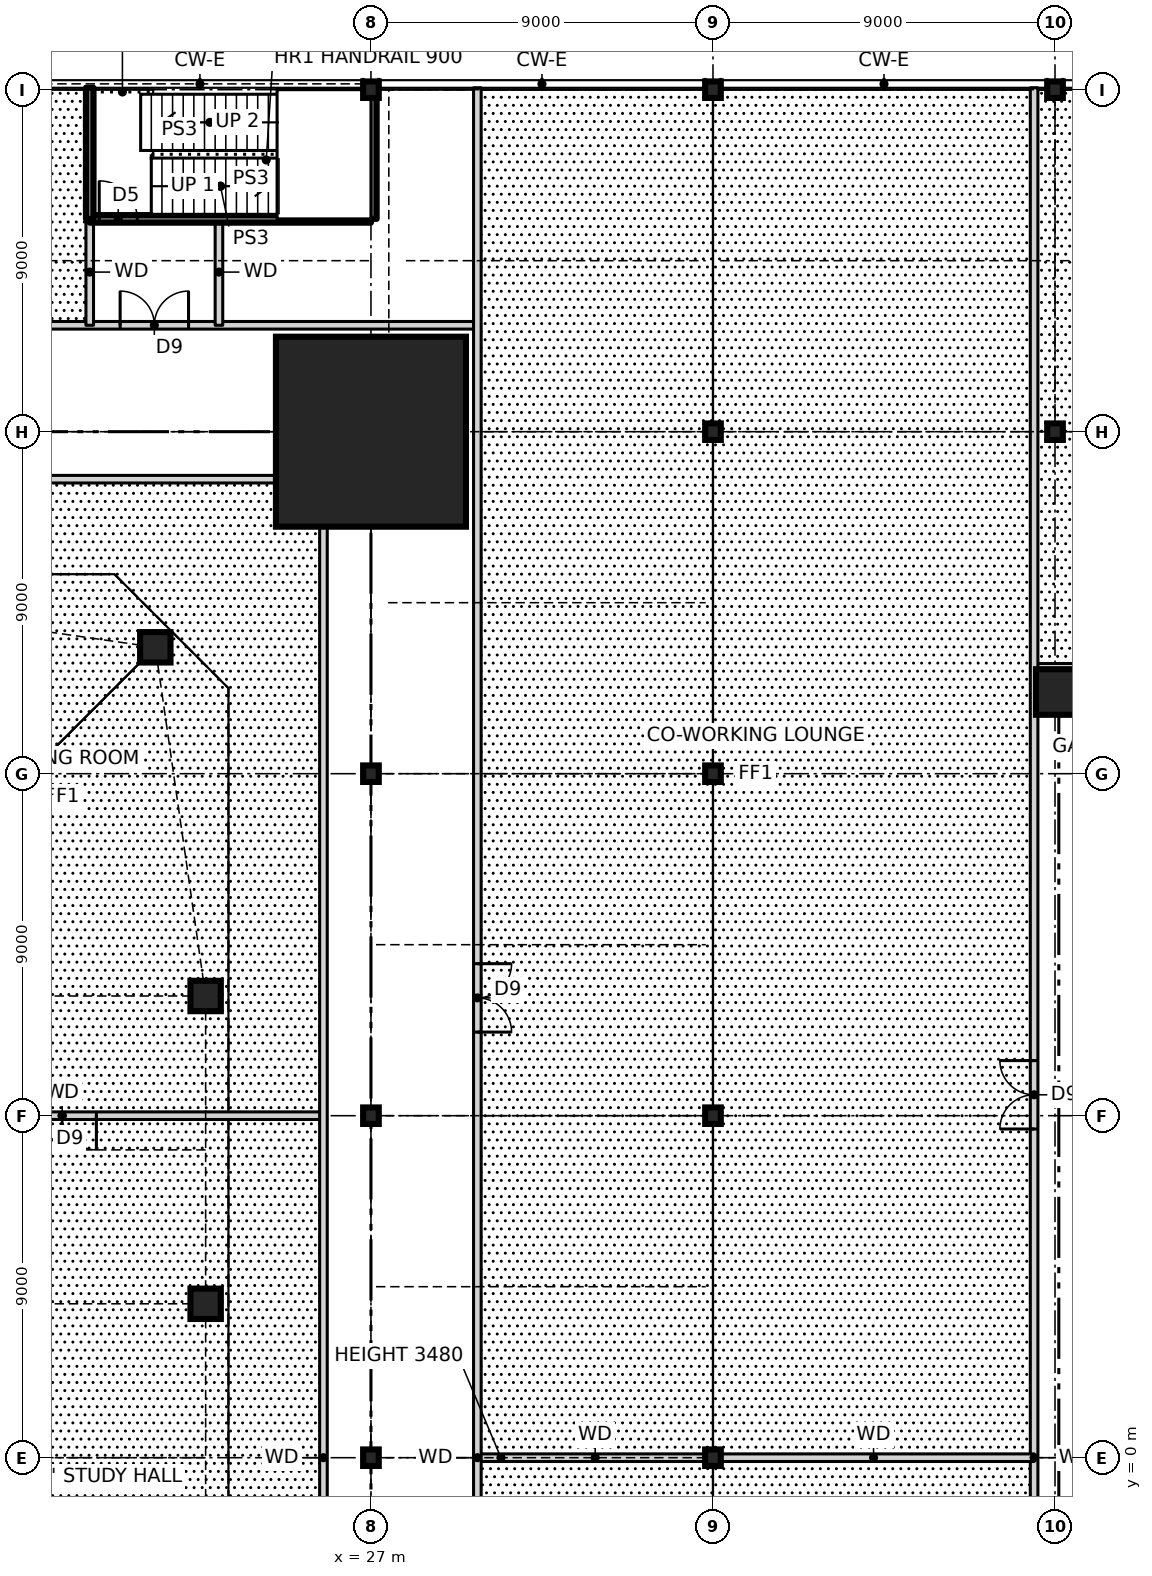
"""IFC4 building model, lengths in metres.
Left out: names, types, materials, properties, quantities, classifications, styles, units other than length and angle.
Written with IfcOpenShell. Run it as: python <this file> out.ifc"""

import sys

from ifc_helpers import new_model, si_unit, direction, frame, frame_2d, origin, origin_2d, place, context, subcontext, project, spatial, rectangle, hollow_rectangle, i_section, extrude, element, fill, save


model = new_model("IFC4")
c1 = context("Model", 3, precision=1e-05, world=origin(), true_north=direction((0.0, 1.0)))
c2 = subcontext(c1, "Body", "Model", "MODEL_VIEW")
j1 = project(units=[si_unit("LENGTHUNIT", "METRE"), si_unit("PLANEANGLEUNIT", "RADIAN")], contexts=[c1])
p1 = place(None, origin())
s1 = spatial("IfcSite", under=j1, at=p1, CompositionType="ELEMENT")
p2 = place(p1, origin())
s2 = spatial("IfcBuilding", under=s1, at=p2, CompositionType="ELEMENT")
p3 = place(p2, frame((0.0, 0.0, 6.0)))
s3 = spatial("IfcBuildingStorey", under=s2, at=p3, CompositionType="ELEMENT", Elevation=6.0)
for number, where, z_axis, x_axis in (
    (1, (22.65, 4.05, 0.0), (0.0, 0.0, 1.0), (1.0, 0.0, 0.0)),
    (2, (22.65, 12.15, 0.0), (0.0, 0.0, 1.0), (1.0, 0.0, 0.0)),
    (3, (21.326, 21.326, 0.0), (0.0, 0.0, 1.0), (1.0, 0.0, 0.0)),
):
    element("IfcColumn", number, at=place(p3, frame(where, z_axis=z_axis, x_axis=x_axis)), inside=s3, PredefinedType="COLUMN", context=c2, shape_type="SweptSolid", body=[
        extrude(hollow_rectangle(XDim=0.8, YDim=0.8, WallThickness=0.09, at=origin_2d()), origin(), (0.0, 0.0, 1.0), 4.5),
    ])
p4 = place(p3, frame((27.0, 27.0, 0.0), z_axis=(0.0, 0.0, 1.0), x_axis=(1.0, 0.0, 0.0)))
e4 = element("IfcColumn", 4, at=p4, inside=s3, PredefinedType="COLUMN", context=c2, shape_type="SweptSolid", body=[
    extrude(rectangle(XDim=5.0, YDim=5.0, at=origin_2d()), origin(), (0.0, 0.0, 1.0), 4.5),
    extrude(i_section(OverallWidth=0.478, OverallDepth=0.599, WebThickness=0.1, FlangeThickness=0.14, at=origin_2d()), origin(), (0.0, 0.0, 1.0), 4.5),
])
p5 = place(p3, frame((45.1, 20.15, 0.0), z_axis=(0.0, 0.0, 1.0), x_axis=(1.0, 0.0, 0.0)))
e5 = element("IfcColumn", 5, at=p5, inside=s3, PredefinedType="COLUMN", context=c2, shape_type="SweptSolid", body=[
    extrude(hollow_rectangle(XDim=1.2, YDim=1.2, WallThickness=0.07, at=origin_2d()), origin(), (0.0, 0.0, 1.0), 4.5),
])
for number, where, z_axis, x_axis in (
    (6, (27.0, 0.0, 0.0), (0.0, 0.0, 1.0), (1.0, 0.0, 0.0)),
    (7, (27.0, 9.0, 0.0), (0.0, 0.0, 1.0), (1.0, 0.0, 0.0)),
    (8, (27.0, 18.0, 0.0), (0.0, 0.0, 1.0), (1.0, 0.0, 0.0)),
    (9, (27.0, 36.0, 0.0), (0.0, 0.0, 1.0), (1.0, 0.0, 0.0)),
    (10, (36.0, 0.0, 0.0), (0.0, 0.0, 1.0), (1.0, 0.0, 0.0)),
    (11, (36.0, 9.0, 0.0), (0.0, 0.0, 1.0), (1.0, 0.0, 0.0)),
    (12, (36.0, 18.0, 0.0), (0.0, 0.0, 1.0), (1.0, 0.0, 0.0)),
    (13, (36.0, 27.0, 0.0), (0.0, 0.0, 1.0), (1.0, 0.0, 0.0)),
    (14, (36.0, 36.0, 0.0), (0.0, 0.0, 1.0), (1.0, 0.0, 0.0)),
    (15, (45.0, 27.0, 0.0), (0.0, 0.0, 1.0), (1.0, 0.0, 0.0)),
    (16, (45.0, 36.0, 0.0), (0.0, 0.0, 1.0), (1.0, 0.0, 0.0)),
):
    element("IfcColumn", number, at=place(p3, frame(where, z_axis=z_axis, x_axis=x_axis)), inside=s3, PredefinedType="COLUMN", context=c2, shape_type="SweptSolid", body=[
        extrude(i_section(OverallWidth=0.411, OverallDepth=0.434, WebThickness=0.036, FlangeThickness=0.057, at=origin_2d()), origin(), (0.0, 0.0, 1.0), 4.5),
    ])
p6 = place(p2, origin())
s4 = spatial("IfcBuildingStorey", under=s2, at=p6, CompositionType="ELEMENT", Elevation=0.0)
for number, where, z_axis, x_axis in (
    (17, (27.506, 36.25, -0.15), (0.0, 0.0, 1.0), (0.0, 1.0, 0.0)),
    (18, (44.494, 36.25, -0.15), (0.0, 0.0, 1.0), (0.0, 1.0, 0.0)),
):
    element("IfcWall", number, at=place(p6, frame(where, z_axis=z_axis, x_axis=x_axis)), inside=s4, PredefinedType="SOLIDWALL", context=c2, shape_type="SweptSolid", body=[
        extrude(rectangle(XDim=3.05, YDim=0.6, at=frame_2d((1.525, 0.0))), origin(), (0.0, 0.0, 1.0), 9.15),
    ])
p7 = place(p3, frame((29.8, 0.0, 0.0), z_axis=(0.0, 0.0, 1.0), x_axis=(1.0, 0.0, 0.0)))
e19 = element("IfcWall", 19, at=p7, inside=s3, PredefinedType="SOLIDWALL", context=c2, shape_type="SweptSolid", body=[
    extrude(rectangle(XDim=6.2, YDim=0.2, at=frame_2d((3.1, 0.0))), origin(), (0.0, 0.0, 1.0), 3.48),
])
p8 = place(p3, frame((12.0, 9.0, 0.0), z_axis=(0.0, 0.0, 1.0), x_axis=(1.0, 0.0, 0.0)))
e20 = element("IfcWall", 20, at=p8, inside=s3, PredefinedType="SOLIDWALL", context=c2, shape_type="SweptSolid", body=[
    extrude(rectangle(XDim=13.75, YDim=0.2, at=frame_2d((6.875, 0.0))), origin(), (0.0, 0.0, 1.0), 4.25),
])
p9 = place(p8, frame((5.975, 0.0, 0.0)))
e21 = element("IfcOpeningElement", 21, at=p9, cuts=e20, PredefinedType="OPENING", context=c2, shape_type="SweptSolid", body=[
    extrude(rectangle(XDim=1.8, YDim=2.1, at=frame_2d((0.9, 1.05))), frame((0.0, 0.11, 0.0), z_axis=(0.0, -1.0, 0.0), x_axis=(1.0, 0.0, 0.0)), (0.0, 0.0, 1.0), 0.22),
])
p10 = place(p3, frame((44.45, 20.8, 0.0), z_axis=(0.0, 0.0, 1.0), x_axis=(1.0, 0.0, 0.0)))
e22 = element("IfcWall", 22, at=p10, inside=s3, PredefinedType="SOLIDWALL", context=c2, shape_type="SweptSolid", body=[
    extrude(rectangle(XDim=37.1, YDim=0.2, at=frame_2d((18.55, 0.0))), origin(), (0.0, 0.0, 1.0), 4.25),
])
p11 = place(p10, frame((9.325, 0.0, 0.0)))
e23 = element("IfcOpeningElement", 23, at=p11, cuts=e22, PredefinedType="OPENING", context=c2, shape_type="SweptSolid", body=[
    extrude(rectangle(XDim=1.8, YDim=2.1, at=frame_2d((0.9, 1.05))), frame((0.0, 0.11, 0.0), z_axis=(0.0, -1.0, 0.0), x_axis=(1.0, 0.0, 0.0)), (0.0, 0.0, 1.0), 0.22),
])
p12 = place(p10, frame((31.125, 0.0, 0.0)))
e24 = element("IfcOpeningElement", 24, at=p12, cuts=e22, PredefinedType="OPENING", context=c2, shape_type="SweptSolid", body=[
    extrude(rectangle(XDim=1.8, YDim=2.1, at=frame_2d((0.9, 1.05))), frame((0.0, 0.11, 0.0), z_axis=(0.0, -1.0, 0.0), x_axis=(1.0, 0.0, 0.0)), (0.0, 0.0, 1.0), 0.22),
])
p13 = place(p10, frame((19.35, 0.0, 0.0)))
e25 = element("IfcOpeningElement", 25, at=p13, cuts=e22, PredefinedType="OPENING", context=c2, shape_type="SweptSolid", body=[
    extrude(rectangle(XDim=1.8, YDim=2.1, at=frame_2d((0.9, 1.05))), frame((0.0, 0.11, 0.0), z_axis=(0.0, -1.0, 0.0), x_axis=(1.0, 0.0, 0.0)), (0.0, 0.0, 1.0), 0.22),
])
p14 = place(p3, frame((-25.75, 25.75, 0.0), z_axis=(0.0, 0.0, 1.0), x_axis=(1.0, 0.0, 0.0)))
e26 = element("IfcWall", 26, at=p14, inside=s3, PredefinedType="SOLIDWALL", context=c2, shape_type="SweptSolid", body=[
    extrude(rectangle(XDim=51.5, YDim=0.2, at=frame_2d((25.75, 0.0))), origin(), (0.0, 0.0, 1.0), 4.25),
])
p15 = place(p3, frame((-29.8, 29.8, 0.0), z_axis=(0.0, 0.0, 1.0), x_axis=(1.0, 0.0, 0.0)))
e27 = element("IfcWall", 27, at=p15, inside=s3, PredefinedType="SOLIDWALL", context=c2, shape_type="SweptSolid", body=[
    extrude(rectangle(XDim=59.6, YDim=0.2, at=frame_2d((29.8, 0.0))), origin(), (0.0, 0.0, 1.0), 4.25),
])
p16 = place(p15, frame((8.1, 0.0, 0.0)))
e28 = element("IfcOpeningElement", 28, at=p16, cuts=e27, PredefinedType="OPENING", context=c2, shape_type="SweptSolid", body=[
    extrude(rectangle(XDim=1.8, YDim=2.1, at=frame_2d((0.9, 1.05))), frame((0.0, 0.11, 0.0), z_axis=(0.0, -1.0, 0.0), x_axis=(1.0, 0.0, 0.0)), (0.0, 0.0, 1.0), 0.22),
])
p17 = place(p15, frame((22.9, 0.0, 0.0)))
e29 = element("IfcOpeningElement", 29, at=p17, cuts=e27, PredefinedType="OPENING", context=c2, shape_type="SweptSolid", body=[
    extrude(rectangle(XDim=1.8, YDim=2.1, at=frame_2d((0.9, 1.05))), frame((0.0, 0.11, 0.0), z_axis=(0.0, -1.0, 0.0), x_axis=(1.0, 0.0, 0.0)), (0.0, 0.0, 1.0), 0.22),
])
p18 = place(p15, frame((28.9, 0.0, 0.0)))
e30 = element("IfcOpeningElement", 30, at=p18, cuts=e27, PredefinedType="OPENING", context=c2, shape_type="SweptSolid", body=[
    extrude(rectangle(XDim=1.8, YDim=2.1, at=frame_2d((0.9, 1.05))), frame((0.0, 0.11, 0.0), z_axis=(0.0, -1.0, 0.0), x_axis=(1.0, 0.0, 0.0)), (0.0, 0.0, 1.0), 0.22),
])
p19 = place(p15, frame((33.2, 0.0, 0.0)))
e31 = element("IfcOpeningElement", 31, at=p19, cuts=e27, PredefinedType="OPENING", context=c2, shape_type="SweptSolid", body=[
    extrude(rectangle(XDim=1.8, YDim=2.1, at=frame_2d((0.9, 1.05))), frame((0.0, 0.11, 0.0), z_axis=(0.0, -1.0, 0.0), x_axis=(1.0, 0.0, 0.0)), (0.0, 0.0, 1.0), 0.22),
])
p20 = place(p15, frame((41.0, 0.0, 0.0)))
e32 = element("IfcOpeningElement", 32, at=p20, cuts=e27, PredefinedType="OPENING", context=c2, shape_type="SweptSolid", body=[
    extrude(rectangle(XDim=1.8, YDim=2.1, at=frame_2d((0.9, 1.05))), frame((0.0, 0.11, 0.0), z_axis=(0.0, -1.0, 0.0), x_axis=(1.0, 0.0, 0.0)), (0.0, 0.0, 1.0), 0.22),
])
p21 = place(p15, frame((50.2, 0.0, 0.0)))
e33 = element("IfcOpeningElement", 33, at=p21, cuts=e27, PredefinedType="OPENING", context=c2, shape_type="SweptSolid", body=[
    extrude(rectangle(XDim=1.8, YDim=2.1, at=frame_2d((0.9, 1.05))), frame((0.0, 0.11, 0.0), z_axis=(0.0, -1.0, 0.0), x_axis=(1.0, 0.0, 0.0)), (0.0, 0.0, 1.0), 0.22),
])
p22 = place(p3, frame((19.6, 32.6, 0.0), z_axis=(0.0, 0.0, 1.0), x_axis=(1.0, 0.0, 0.0)))
e34 = element("IfcWall", 34, at=p22, inside=s3, PredefinedType="SOLIDWALL", context=c2, shape_type="SweptSolid", body=[
    extrude(rectangle(XDim=7.4, YDim=0.2, at=frame_2d((3.7, 0.0))), origin(), (0.0, 0.0, 1.0), 4.5),
])
p23 = place(p22, frame((0.25, 0.0, 0.0)))
e35 = element("IfcOpeningElement", 35, at=p23, cuts=e34, PredefinedType="OPENING", context=c2, shape_type="SweptSolid", body=[
    extrude(rectangle(XDim=1.0, YDim=2.1, at=frame_2d((0.5, 1.05))), frame((0.0, 0.11, 0.0), z_axis=(0.0, -1.0, 0.0), x_axis=(1.0, 0.0, 0.0)), (0.0, 0.0, 1.0), 0.22),
])
p24 = place(p3, frame((44.45, -36.05, 0.0), z_axis=(0.0, 0.0, 1.0), x_axis=(0.0, 1.0, 0.0)))
e36 = element("IfcWall", 36, at=p24, inside=s3, PredefinedType="SOLIDWALL", context=c2, shape_type="SweptSolid", body=[
    extrude(rectangle(XDim=72.1, YDim=0.2, at=frame_2d((36.05, 0.0))), origin(), (0.0, 0.0, 1.0), 4.25),
])
p25 = place(p24, frame((25.6, 0.0, 0.0)))
e37 = element("IfcOpeningElement", 37, at=p25, cuts=e36, PredefinedType="OPENING", context=c2, shape_type="SweptSolid", body=[
    extrude(rectangle(XDim=1.8, YDim=2.1, at=frame_2d((0.9, 1.05))), frame((0.0, 0.11, 0.0), z_axis=(0.0, -1.0, 0.0), x_axis=(1.0, 0.0, 0.0)), (0.0, 0.0, 1.0), 0.22),
])
p26 = place(p24, frame((44.7, 0.0, 0.0)))
e38 = element("IfcOpeningElement", 38, at=p26, cuts=e36, PredefinedType="OPENING", context=c2, shape_type="SweptSolid", body=[
    extrude(rectangle(XDim=1.8, YDim=2.1, at=frame_2d((0.9, 1.05))), frame((0.0, 0.11, 0.0), z_axis=(0.0, -1.0, 0.0), x_axis=(1.0, 0.0, 0.0)), (0.0, 0.0, 1.0), 0.22),
])
p27 = place(p3, frame((29.8, -36.05, 0.0), z_axis=(0.0, 0.0, 1.0), x_axis=(0.0, 1.0, 0.0)))
e39 = element("IfcWall", 39, at=p27, inside=s3, PredefinedType="SOLIDWALL", context=c2, shape_type="SweptSolid", body=[
    extrude(rectangle(XDim=72.1, YDim=0.2, at=frame_2d((36.05, 0.0))), origin(), (0.0, 0.0, 1.0), 4.25),
])
p28 = place(p27, frame((23.05, 0.0, 0.0)))
e40 = element("IfcOpeningElement", 40, at=p28, cuts=e39, PredefinedType="OPENING", context=c2, shape_type="SweptSolid", body=[
    extrude(rectangle(XDim=1.8, YDim=2.1, at=frame_2d((0.9, 1.05))), frame((0.0, 0.11, 0.0), z_axis=(0.0, -1.0, 0.0), x_axis=(1.0, 0.0, 0.0)), (0.0, 0.0, 1.0), 0.22),
])
p29 = place(p27, frame((47.25, 0.0, 0.0)))
e41 = element("IfcOpeningElement", 41, at=p29, cuts=e39, PredefinedType="OPENING", context=c2, shape_type="SweptSolid", body=[
    extrude(rectangle(XDim=1.8, YDim=2.1, at=frame_2d((0.9, 1.05))), frame((0.0, 0.11, 0.0), z_axis=(0.0, -1.0, 0.0), x_axis=(1.0, 0.0, 0.0)), (0.0, 0.0, 1.0), 0.22),
])
p30 = place(p3, frame((27.0, 32.6, 0.0), z_axis=(0.0, 0.0, 1.0), x_axis=(0.0, 1.0, 0.0)))
e42 = element("IfcWall", 42, at=p30, inside=s3, PredefinedType="SOLIDWALL", context=c2, shape_type="SweptSolid", body=[
    extrude(rectangle(XDim=3.183, YDim=0.3, at=frame_2d((1.591, 0.0))), origin(), (0.0, 0.0, 1.0), 4.5),
])
p31 = place(p3, frame((25.75, -25.75, 0.0), z_axis=(0.0, 0.0, 1.0), x_axis=(0.0, 1.0, 0.0)))
e43 = element("IfcWall", 43, at=p31, inside=s3, PredefinedType="SOLIDWALL", context=c2, shape_type="SweptSolid", body=[
    extrude(rectangle(XDim=51.5, YDim=0.2, at=frame_2d((25.75, 0.0))), origin(), (0.0, 0.0, 1.0), 4.25),
])
for number, where, z_axis, x_axis in (
    (44, (23.0, 29.8, 0.0), (0.0, 0.0, 1.0), (0.0, 1.0, 0.0)),
    (45, (19.6, 29.8, 0.0), (0.0, 0.0, 1.0), (0.0, 1.0, 0.0)),
):
    element("IfcWall", number, at=place(p3, frame(where, z_axis=z_axis, x_axis=x_axis)), inside=s3, PredefinedType="SOLIDWALL", context=c2, shape_type="SweptSolid", body=[
        extrude(rectangle(XDim=2.8, YDim=0.2, at=frame_2d((1.4, 0.0))), origin(), (0.0, 0.0, 1.0), 4.25),
    ])
p32 = place(p3, frame((19.6, 32.6, 0.0), z_axis=(0.0, 0.0, 1.0), x_axis=(0.0, 1.0, 0.0)))
e46 = element("IfcWall", 46, at=p32, inside=s3, PredefinedType="SOLIDWALL", context=c2, shape_type="SweptSolid", body=[
    extrude(rectangle(XDim=3.45, YDim=0.2, at=frame_2d((1.725, 0.0))), origin(), (0.0, 0.0, 1.0), 4.5),
])
p33 = place(p3, frame((36.0, 0.0, 0.0), z_axis=(0.0, 0.0, 1.0), x_axis=(1.0, 0.0, 0.0)))
e47 = element("IfcWall", 47, at=p33, inside=s3, PredefinedType="SOLIDWALL", context=c2, shape_type="SweptSolid", body=[
    extrude(rectangle(XDim=8.45, YDim=0.2, at=frame_2d((4.225, 0.0))), origin(), (0.0, 0.0, 1.0), 4.25),
])
p34 = place(p9, frame((1.8, 0.0, 0.0), z_axis=(0.0, 0.0, 1.0), x_axis=(-1.0, 0.0, 0.0)))
e48 = element("IfcDoor", 48, at=p34, inside=s3, OperationType="DOUBLE_DOOR_SINGLE_SWING", PredefinedType="DOOR", context=c2, shape_type="SweptSolid", body=[
    extrude(rectangle(XDim=1.8, YDim=2.1, at=frame_2d((0.9, 1.05))), frame((0.0, 0.025, 0.0), z_axis=(0.0, -1.0, 0.0), x_axis=(1.0, 0.0, 0.0)), (0.0, 0.0, 1.0), 0.05),
])
fill(e21, e48)
p35 = place(p29, frame((1.8, 0.0, 0.0), z_axis=(0.0, 0.0, 1.0), x_axis=(-1.0, 0.0, 0.0)))
e49 = element("IfcDoor", 49, at=p35, inside=s3, OperationType="DOUBLE_DOOR_SINGLE_SWING", PredefinedType="DOOR", context=c2, shape_type="SweptSolid", body=[
    extrude(rectangle(XDim=1.8, YDim=2.1, at=frame_2d((0.9, 1.05))), frame((0.0, 0.025, 0.0), z_axis=(0.0, -1.0, 0.0), x_axis=(1.0, 0.0, 0.0)), (0.0, 0.0, 1.0), 0.05),
])
fill(e41, e49)
p36 = place(p26, origin())
e50 = element("IfcDoor", 50, at=p36, inside=s3, OperationType="DOUBLE_DOOR_SINGLE_SWING", PredefinedType="DOOR", context=c2, shape_type="SweptSolid", body=[
    extrude(rectangle(XDim=1.8, YDim=2.1, at=frame_2d((0.9, 1.05))), frame((0.0, 0.025, 0.0), z_axis=(0.0, -1.0, 0.0), x_axis=(1.0, 0.0, 0.0)), (0.0, 0.0, 1.0), 0.05),
])
fill(e38, e50)
p37 = place(p21, origin())
e51 = element("IfcDoor", 51, at=p37, inside=s3, OperationType="DOUBLE_DOOR_SINGLE_SWING", PredefinedType="DOOR", context=c2, shape_type="SweptSolid", body=[
    extrude(rectangle(XDim=1.8, YDim=2.1, at=frame_2d((0.9, 1.05))), frame((0.0, 0.025, 0.0), z_axis=(0.0, -1.0, 0.0), x_axis=(1.0, 0.0, 0.0)), (0.0, 0.0, 1.0), 0.05),
])
fill(e33, e51)
p38 = place(p23, origin())
e52 = element("IfcDoor", 52, at=p38, inside=s3, OperationType="SINGLE_SWING_LEFT", PredefinedType="DOOR", context=c2, shape_type="SweptSolid", body=[
    extrude(rectangle(XDim=1.0, YDim=2.1, at=frame_2d((0.5, 1.05))), frame((0.0, 0.025, 0.0), z_axis=(0.0, -1.0, 0.0), x_axis=(1.0, 0.0, 0.0)), (0.0, 0.0, 1.0), 0.05),
])
fill(e35, e52)
save(model, sys.argv[1])
